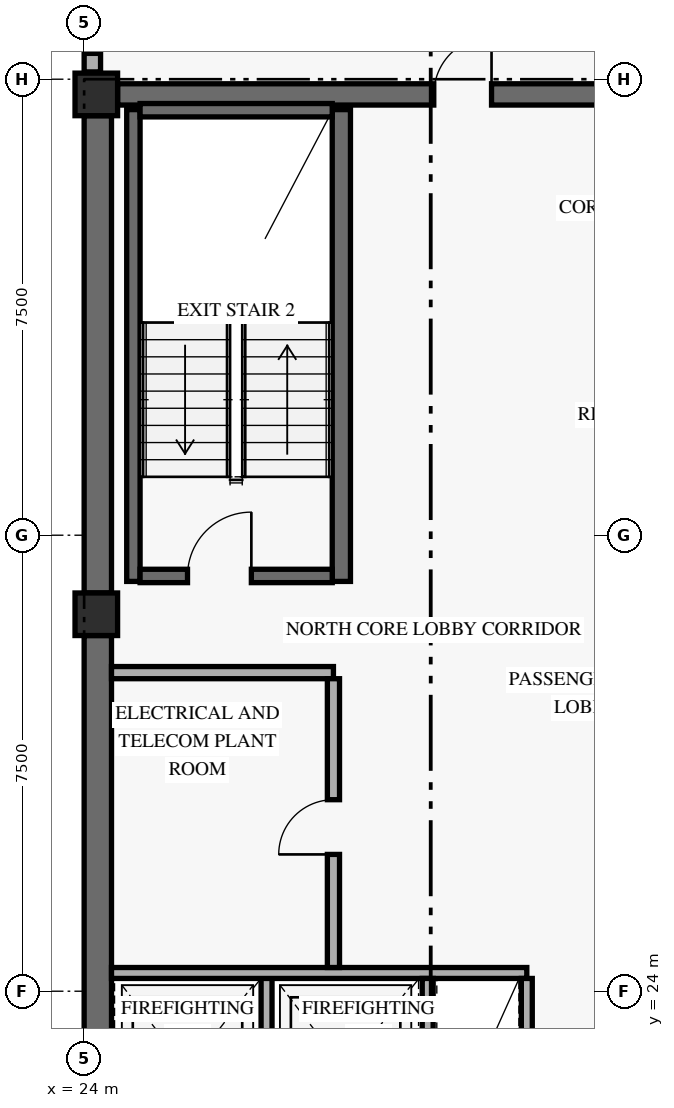
"""IFC4 building model, lengths in metres.
Left out: names, types, materials, properties, quantities, classifications, styles, units other than length and angle.
Written with IfcOpenShell. Run it as: python <this file> out.ifc"""

import sys

from ifc_helpers import new_model, si_unit, direction, frame, frame_2d, origin, origin_2d, place, context, subcontext, project, spatial, rectangle, extrude, element, fill, save


model = new_model("IFC4")
c1 = context("Model", 3, precision=1e-05, world=origin(), true_north=direction((0.0, 1.0)))
c2 = subcontext(c1, "Body", "Model", "MODEL_VIEW")
j1 = project(units=[si_unit("LENGTHUNIT", "METRE"), si_unit("PLANEANGLEUNIT", "RADIAN")], contexts=[c1])
p1 = place(None, origin())
s1 = spatial("IfcSite", under=j1, at=p1, CompositionType="ELEMENT")
p2 = place(p1, origin())
s2 = spatial("IfcBuilding", under=s1, at=p2, CompositionType="ELEMENT")
p3 = place(p2, frame((0.0, 0.0, 227.4)))
s3 = spatial("IfcBuildingStorey", under=s2, at=p3, CompositionType="ELEMENT", Elevation=227.4)
p4 = place(p3, frame((24.225, 17.9, 0.0), z_axis=(0.0, 0.0, 1.0), x_axis=(0.0, 1.0, 0.0)))
e1 = element("IfcWall", 1, at=p4, inside=s3, PredefinedType="SHEAR", context=c2, shape_type="SweptSolid", body=[
    extrude(rectangle(XDim=11.95, YDim=0.45, at=frame_2d((5.975, 0.0))), origin(), (0.0, 0.0, 1.0), 2.811),
])
p5 = place(p3, frame((24.225, 30.55, 0.0), z_axis=(0.0, 0.0, 1.0), x_axis=(0.0, 1.0, 0.0)))
e2 = element("IfcWall", 2, at=p5, inside=s3, PredefinedType="SHEAR", context=c2, shape_type="SweptSolid", body=[
    extrude(rectangle(XDim=7.85, YDim=0.45, at=frame_2d((3.925, 0.0))), origin(), (0.0, 0.0, 1.0), 2.811),
])
p6 = place(p3, frame((24.55, 38.75, 0.0), z_axis=(0.0, 0.0, 1.0), x_axis=(1.0, 0.0, 0.0)))
e3 = element("IfcWall", 3, at=p6, inside=s3, PredefinedType="SHEAR", context=c2, shape_type="SweptSolid", body=[
    extrude(rectangle(XDim=10.3, YDim=0.35, at=frame_2d((5.15, 0.0))), origin(), (0.0, 0.0, 1.0), 3.35),
])
p7 = place(p6, frame((5.2, 0.0, 0.0)))
e4 = element("IfcOpeningElement", 4, at=p7, cuts=e3, PredefinedType="OPENING", context=c2, shape_type="SweptSolid", body=[
    extrude(rectangle(XDim=0.95, YDim=2.15, at=frame_2d((0.475, 1.075))), frame((0.0, 0.185, 0.0), z_axis=(0.0, -1.0, 0.0), x_axis=(1.0, 0.0, 0.0)), (0.0, 0.0, 1.0), 0.37),
])
p8 = place(p3, frame((24.81, 30.74, 0.0), z_axis=(0.0, 0.0, 1.0), x_axis=(0.0, 1.0, 0.0)))
e5 = element("IfcWall", 5, at=p8, inside=s3, PredefinedType="SHEAR", context=c2, shape_type="SweptSolid", body=[
    extrude(rectangle(XDim=7.76, YDim=0.22, at=frame_2d((3.88, 0.0))), origin(), (0.0, 0.0, 1.0), 3.35),
])
p9 = place(p3, frame((28.23, 30.74, 0.0), z_axis=(0.0, 0.0, 1.0), x_axis=(0.0, 1.0, 0.0)))
e6 = element("IfcWall", 6, at=p9, inside=s3, PredefinedType="SHEAR", context=c2, shape_type="SweptSolid", body=[
    extrude(rectangle(XDim=7.76, YDim=0.3, at=frame_2d((3.88, 0.0))), origin(), (0.0, 0.0, 1.0), 3.35),
])
p10 = place(p3, frame((24.92, 30.83, 0.0), z_axis=(0.0, 0.0, 1.0), x_axis=(1.0, 0.0, 0.0)))
e7 = element("IfcWall", 7, at=p10, inside=s3, PredefinedType="SHEAR", context=c2, shape_type="SweptSolid", body=[
    extrude(rectangle(XDim=3.16, YDim=0.22, at=frame_2d((1.58, 0.0))), origin(), (0.0, 0.0, 1.0), 3.35),
])
p11 = place(p10, frame((0.78, 0.0, 0.0)))
e8 = element("IfcOpeningElement", 8, at=p11, cuts=e7, PredefinedType="OPENING", context=c2, shape_type="SweptSolid", body=[
    extrude(rectangle(XDim=1.05, YDim=2.15, at=frame_2d((0.525, 1.075))), frame((0.0, 0.12, 0.0), z_axis=(0.0, -1.0, 0.0), x_axis=(1.0, 0.0, 0.0)), (0.0, 0.0, 1.0), 0.24),
])
p12 = place(p3, frame((24.92, 38.49, 0.0), z_axis=(0.0, 0.0, 1.0), x_axis=(1.0, 0.0, 0.0)))
e9 = element("IfcWall", 9, at=p12, inside=s3, PredefinedType="SHEAR", context=c2, shape_type="SweptSolid", body=[
    extrude(rectangle(XDim=3.16, YDim=0.22, at=frame_2d((1.58, 0.0))), origin(), (0.0, 0.0, 1.0), 3.35),
])
for number, where, z_axis, x_axis in (
    (10, (24.2, 30.2, 0.0), (0.0, 0.0, 1.0), (1.0, 0.0, 0.0)),
    (11, (24.2, 38.75, 0.0), (0.0, 0.0, 1.0), (1.0, 0.0, 0.0)),
):
    element("IfcColumn", number, at=place(p3, frame(where, z_axis=z_axis, x_axis=x_axis)), inside=s3, PredefinedType="COLUMN", context=c2, shape_type="SweptSolid", body=[
        extrude(rectangle(XDim=0.7, YDim=0.7, at=origin_2d()), origin(), (0.0, 0.0, 1.0), 3.6),
    ])
p13 = place(p3, frame((24.135, 39.12, 0.0), z_axis=(0.0, 0.0, 1.0), x_axis=(0.0, 1.0, 0.0)))
e12 = element("IfcWall", 12, at=p13, inside=s3, PredefinedType="SOLIDWALL", context=c2, shape_type="SweptSolid", body=[
    extrude(rectangle(XDim=1.56, YDim=0.27, at=frame_2d((0.78, 0.0))), origin(), (0.0, 0.0, 1.0), 2.793),
])
p14 = place(p13, frame((0.305, 0.0, 0.85)))
e13 = element("IfcOpeningElement", 13, at=p14, cuts=e12, PredefinedType="OPENING", context=c2, shape_type="SweptSolid", body=[
    extrude(rectangle(XDim=0.95, YDim=1.5, at=frame_2d((0.475, 0.75))), frame((0.0, 0.145, 0.0), z_axis=(0.0, -1.0, 0.0), x_axis=(1.0, 0.0, 0.0)), (0.0, 0.0, 1.0), 0.29),
])
p15 = place(p3, frame((27.0, 21.19, 0.0), z_axis=(0.0, 0.0, 1.0), x_axis=(0.0, 1.0, 0.0)))
e14 = element("IfcWall", 14, at=p15, inside=s3, PredefinedType="STANDARD", context=c2, shape_type="SweptSolid", body=[
    extrude(rectangle(XDim=3.11, YDim=0.18, at=frame_2d((1.555, 0.0))), origin(), (0.0, 0.0, 1.0), 3.35),
])
p16 = place(p3, frame((24.45, 24.3, 0.0), z_axis=(0.0, 0.0, 1.0), x_axis=(1.0, 0.0, 0.0)))
e15 = element("IfcWall", 15, at=p16, inside=s3, PredefinedType="STANDARD", context=c2, shape_type="SweptSolid", body=[
    extrude(rectangle(XDim=6.83, YDim=0.18, at=frame_2d((3.415, 0.0))), origin(), (0.0, 0.0, 1.0), 3.35),
])
for number, where, z_axis, x_axis in (
    (16, (29.65, 21.19, 0.0), (0.0, 0.0, 1.0), (0.0, 1.0, 0.0)),
    (17, (31.28, 21.19, 0.0), (0.0, 0.0, 1.0), (0.0, 1.0, 0.0)),
):
    element("IfcWall", number, at=place(p3, frame(where, z_axis=z_axis, x_axis=x_axis)), inside=s3, PredefinedType="STANDARD", context=c2, shape_type="SweptSolid", body=[
        extrude(rectangle(XDim=3.02, YDim=0.18, at=frame_2d((1.51, 0.0))), origin(), (0.0, 0.0, 1.0), 3.35),
    ])
p17 = place(p3, frame((24.45, 29.24, 0.0), z_axis=(0.0, 0.0, 1.0), x_axis=(1.0, 0.0, 0.0)))
e18 = element("IfcWall", 18, at=p17, inside=s3, PredefinedType="STANDARD", context=c2, shape_type="SweptSolid", body=[
    extrude(rectangle(XDim=3.65, YDim=0.2, at=frame_2d((1.825, 0.0))), origin(), (0.0, 0.0, 1.0), 3.35),
])
p18 = place(p3, frame((28.1, 24.39, 0.0), z_axis=(0.0, 0.0, 1.0), x_axis=(0.0, 1.0, 0.0)))
e19 = element("IfcWall", 19, at=p18, inside=s3, PredefinedType="STANDARD", context=c2, shape_type="SweptSolid", body=[
    extrude(rectangle(XDim=4.75, YDim=0.2, at=frame_2d((2.375, 0.0))), origin(), (0.0, 0.0, 1.0), 3.35),
])
p19 = place(p18, frame((1.86, 0.0, 0.0)))
e20 = element("IfcOpeningElement", 20, at=p19, cuts=e19, PredefinedType="OPENING", context=c2, shape_type="SweptSolid", body=[
    extrude(rectangle(XDim=0.9, YDim=2.1, at=frame_2d((0.45, 1.05))), frame((0.0, 0.11, 0.0), z_axis=(0.0, -1.0, 0.0), x_axis=(1.0, 0.0, 0.0)), (0.0, 0.0, 1.0), 0.22),
])
p20 = place(p14, origin())
e21 = element("IfcWindow", 21, at=p20, inside=s3, PartitioningType="SINGLE_PANEL", PredefinedType="WINDOW", context=c2, shape_type="SweptSolid", body=[
    extrude(rectangle(XDim=0.95, YDim=1.5, at=frame_2d((0.475, 0.75))), frame((0.0, 0.03, 0.0), z_axis=(0.0, -1.0, 0.0), x_axis=(1.0, 0.0, 0.0)), (0.0, 0.0, 1.0), 0.06),
])
fill(e13, e21)
p21 = place(p11, origin())
e22 = element("IfcDoor", 22, at=p21, inside=s3, OperationType="SINGLE_SWING_RIGHT", PredefinedType="DOOR", context=c2, shape_type="SweptSolid", body=[
    extrude(rectangle(XDim=1.05, YDim=2.15, at=frame_2d((0.525, 1.075))), frame((0.0, 0.025, 0.0), z_axis=(0.0, -1.0, 0.0), x_axis=(1.0, 0.0, 0.0)), (0.0, 0.0, 1.0), 0.05),
])
fill(e8, e22)
p22 = place(p19, origin())
e23 = element("IfcDoor", 23, at=p22, inside=s3, OperationType="SINGLE_SWING_LEFT", PredefinedType="DOOR", context=c2, shape_type="SweptSolid", body=[
    extrude(rectangle(XDim=0.9, YDim=2.1, at=frame_2d((0.45, 1.05))), frame((0.0, 0.025, 0.0), z_axis=(0.0, -1.0, 0.0), x_axis=(1.0, 0.0, 0.0)), (0.0, 0.0, 1.0), 0.05),
])
fill(e20, e23)
p23 = place(p7, origin())
e24 = element("IfcDoor", 24, at=p23, inside=s3, OperationType="SINGLE_SWING_RIGHT", PredefinedType="DOOR", context=c2, shape_type="SweptSolid", body=[
    extrude(rectangle(XDim=0.95, YDim=2.15, at=frame_2d((0.475, 1.075))), frame((0.0, 0.025, 0.0), z_axis=(0.0, -1.0, 0.0), x_axis=(1.0, 0.0, 0.0)), (0.0, 0.0, 1.0), 0.05),
])
fill(e4, e24)
save(model, sys.argv[1])
